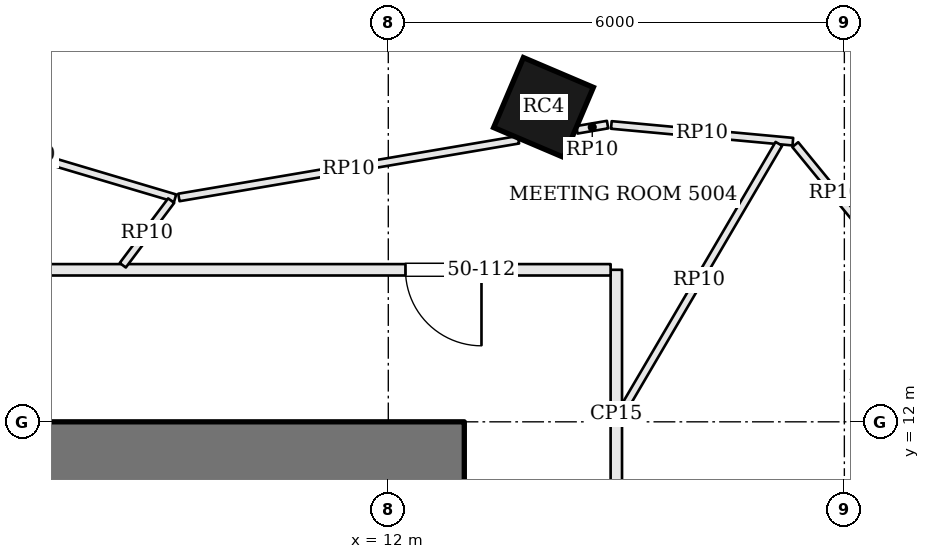
"""IFC4 building model, lengths in metres.
Left out: names, types, materials, properties, quantities, classifications, styles, units other than length and angle.
Written with IfcOpenShell. Run it as: python <this file> out.ifc"""

import sys

from ifc_helpers import new_model, si_unit, direction, frame, frame_2d, origin, origin_2d, place, context, subcontext, project, spatial, rectangle, extrude, element, fill, save


model = new_model("IFC4")
c1 = context("Model", 3, precision=1e-05, world=origin(), true_north=direction((0.0, 1.0)))
c2 = subcontext(c1, "Body", "Model", "MODEL_VIEW")
j1 = project(units=[si_unit("LENGTHUNIT", "METRE"), si_unit("PLANEANGLEUNIT", "RADIAN")], contexts=[c1])
p1 = place(None, origin())
s1 = spatial("IfcSite", under=j1, at=p1, CompositionType="ELEMENT")
p2 = place(p1, origin())
s2 = spatial("IfcBuilding", under=s1, at=p2, CompositionType="ELEMENT")
p3 = place(p2, frame((0.0, 0.0, 205.2)))
s3 = spatial("IfcBuildingStorey", under=s2, at=p3, CompositionType="ELEMENT", Elevation=205.2)
p4 = place(p3, frame((-13.0, 11.6, 0.0), z_axis=(0.0, 0.0, 1.0), x_axis=(1.0, 0.0, 0.0)))
e1 = element("IfcWall", 1, at=p4, inside=s3, PredefinedType="SHEAR", context=c2, shape_type="SweptSolid", body=[
    extrude(rectangle(XDim=26.0, YDim=0.8, at=frame_2d((13.0, 0.0))), origin(), (0.0, 0.0, 1.0), 3.9),
])
p5 = place(p4, frame((9.225, 0.0, 0.0)))
e2 = element("IfcOpeningElement", 2, at=p5, cuts=e1, PredefinedType="OPENING", context=c2, shape_type="SweptSolid", body=[
    extrude(rectangle(XDim=1.0, YDim=2.1, at=frame_2d((0.5, 1.05))), frame((0.0, 0.41, 0.0), z_axis=(0.0, -1.0, 0.0), x_axis=(1.0, 0.0, 0.0)), (0.0, 0.0, 1.0), 0.82),
])
p6 = place(p4, frame((11.825, 0.0, 0.0)))
e3 = element("IfcOpeningElement", 3, at=p6, cuts=e1, PredefinedType="OPENING", context=c2, shape_type="SweptSolid", body=[
    extrude(rectangle(XDim=0.7, YDim=2.1, at=frame_2d((0.35, 1.05))), frame((0.0, 0.41, 0.0), z_axis=(0.0, -1.0, 0.0), x_axis=(1.0, 0.0, 0.0)), (0.0, 0.0, 1.0), 0.82),
])
p7 = place(p4, frame((14.125, 0.0, 0.0)))
e4 = element("IfcOpeningElement", 4, at=p7, cuts=e1, PredefinedType="OPENING", context=c2, shape_type="SweptSolid", body=[
    extrude(rectangle(XDim=1.0, YDim=2.1, at=frame_2d((0.5, 1.05))), frame((0.0, 0.41, 0.0), z_axis=(0.0, -1.0, 0.0), x_axis=(1.0, 0.0, 0.0)), (0.0, 0.0, 1.0), 0.82),
])
p8 = place(p4, frame((16.625, 0.0, 0.0)))
e5 = element("IfcOpeningElement", 5, at=p8, cuts=e1, PredefinedType="OPENING", context=c2, shape_type="SweptSolid", body=[
    extrude(rectangle(XDim=0.9, YDim=2.1, at=frame_2d((0.45, 1.05))), frame((0.0, 0.41, 0.0), z_axis=(0.0, -1.0, 0.0), x_axis=(1.0, 0.0, 0.0)), (0.0, 0.0, 1.0), 0.82),
])
p9 = place(p3, frame((14.042, 16.136, 0.0), z_axis=(0.0, 0.0, 1.0), x_axis=(-0.920167856842, 0.391524092789, 0.0)))
e6 = element("IfcColumn", 6, at=p9, inside=s3, PredefinedType="COLUMN", context=c2, shape_type="SweptSolid", body=[
    extrude(rectangle(XDim=1.0, YDim=1.0, at=origin_2d()), origin(), (0.0, 0.0, 1.0), 3.9),
])
p10 = place(p3, frame((15.0, 10.196, 0.0), z_axis=(0.0, 0.0, 1.0), x_axis=(0.0, 1.0, 0.0)))
e7 = element("IfcWall", 7, at=p10, inside=s3, PredefinedType="PARTITIONING", context=c2, shape_type="SweptSolid", body=[
    extrude(rectangle(XDim=3.804, YDim=0.15, at=frame_2d((1.902, 0.0))), origin(), (0.0, 0.0, 1.0), 3.084),
])
p11 = place(p3, frame((14.925, 14.0, 0.0), z_axis=(0.0, 0.0, 1.0), x_axis=(-1.0, 0.0, 0.0)))
e8 = element("IfcWall", 8, at=p11, inside=s3, PredefinedType="PARTITIONING", context=c2, shape_type="SweptSolid", body=[
    extrude(rectangle(XDim=29.925, YDim=0.15, at=frame_2d((14.962, 0.0))), origin(), (0.0, 0.0, 1.0), 3.084),
])
p12 = place(p11, frame((1.699, 0.0, 0.0)))
e9 = element("IfcOpeningElement", 9, at=p12, cuts=e8, PredefinedType="OPENING", context=c2, shape_type="SweptSolid", body=[
    extrude(rectangle(XDim=1.0, YDim=2.4, at=frame_2d((0.5, 1.2))), frame((0.0, 0.085, 0.0), z_axis=(0.0, -1.0, 0.0), x_axis=(1.0, 0.0, 0.0)), (0.0, 0.0, 1.0), 0.17),
])
p13 = place(p11, frame((10.223, 0.0, 0.0)))
e10 = element("IfcOpeningElement", 10, at=p13, cuts=e8, PredefinedType="OPENING", context=c2, shape_type="SweptSolid", body=[
    extrude(rectangle(XDim=1.0, YDim=2.4, at=frame_2d((0.5, 1.2))), frame((0.0, 0.085, 0.0), z_axis=(0.0, -1.0, 0.0), x_axis=(1.0, 0.0, 0.0)), (0.0, 0.0, 1.0), 0.17),
])
p14 = place(p11, frame((18.49, 0.0, 0.0)))
e11 = element("IfcOpeningElement", 11, at=p14, cuts=e8, PredefinedType="OPENING", context=c2, shape_type="SweptSolid", body=[
    extrude(rectangle(XDim=1.0, YDim=2.4, at=frame_2d((0.5, 1.2))), frame((0.0, 0.085, 0.0), z_axis=(0.0, -1.0, 0.0), x_axis=(1.0, 0.0, 0.0)), (0.0, 0.0, 1.0), 0.17),
])
p15 = place(p3, frame((5.377, 16.079, 0.0), z_axis=(0.0, 0.0, 1.0), x_axis=(0.958503323659, -0.28508135424, 0.0)))
e12 = element("IfcWall", 12, at=p15, inside=s3, PredefinedType="PARTITIONING", context=c2, shape_type="SweptSolid", body=[
    extrude(rectangle(XDim=3.984, YDim=0.1, at=frame_2d((1.992, 0.0))), origin(), (0.0, 0.0, 1.0), 3.084),
])
p16 = place(p3, frame((9.245, 14.952, 0.0), z_axis=(0.0, 0.0, 1.0), x_axis=(0.985863233989, 0.167552033319, 0.0)))
e13 = element("IfcWall", 13, at=p16, inside=s3, PredefinedType="PARTITIONING", context=c2, shape_type="SweptSolid", body=[
    extrude(rectangle(XDim=4.531, YDim=0.1, at=frame_2d((2.266, 0.0))), origin(), (0.0, 0.0, 1.0), 3.084),
])
p17 = place(p3, frame((14.482, 15.842, 0.0), z_axis=(0.0, 0.0, 1.0), x_axis=(0.985806446381, 0.167885825111, 0.0)))
e14 = element("IfcWall", 14, at=p17, inside=s3, PredefinedType="PARTITIONING", context=c2, shape_type="SweptSolid", body=[
    extrude(rectangle(XDim=0.409, YDim=0.1, at=frame_2d((0.204, 0.0))), origin(), (0.0, 0.0, 1.0), 3.084),
])
p18 = place(p3, frame((14.935, 15.906, 0.0), z_axis=(0.0, 0.0, 1.0), x_axis=(0.995783150827, -0.09173830459, 0.0)))
e15 = element("IfcWall", 15, at=p18, inside=s3, PredefinedType="PARTITIONING", context=c2, shape_type="SweptSolid", body=[
    extrude(rectangle(XDim=2.398, YDim=0.1, at=frame_2d((1.199, 0.0))), origin(), (0.0, 0.0, 1.0), 3.084),
])
p19 = place(p3, frame((17.354, 15.647, 0.0), z_axis=(0.0, 0.0, 1.0), x_axis=(0.632948103301, -0.774194225326, 0.0)))
e16 = element("IfcWall", 16, at=p19, inside=s3, PredefinedType="PARTITIONING", context=c2, shape_type="SweptSolid", body=[
    extrude(rectangle(XDim=1.652, YDim=0.1, at=frame_2d((0.826, 0.0))), origin(), (0.0, 0.0, 1.0), 3.084),
])
p20 = place(p3, frame((15.038, 12.074, 0.0), z_axis=(0.0, 0.0, 1.0), x_axis=(0.5056938513, 0.862713004862, 0.0)))
e17 = element("IfcWall", 17, at=p20, inside=s3, PredefinedType="PARTITIONING", context=c2, shape_type="SweptSolid", body=[
    extrude(rectangle(XDim=4.153, YDim=0.1, at=frame_2d((2.076, 0.0))), origin(), (0.0, 0.0, 1.0), 3.084),
])
p21 = place(p3, frame((8.507, 14.06, 0.0), z_axis=(0.0, 0.0, 1.0), x_axis=(0.599742509515, 0.800193053132, 0.0)))
e18 = element("IfcWall", 18, at=p21, inside=s3, PredefinedType="PARTITIONING", context=c2, shape_type="SweptSolid", body=[
    extrude(rectangle(XDim=1.062, YDim=0.1, at=frame_2d((0.531, 0.0))), origin(), (0.0, 0.0, 1.0), 3.084),
])
p22 = place(p12, origin())
e19 = element("IfcDoor", 19, at=p22, inside=s3, OperationType="SINGLE_SWING_LEFT", PredefinedType="DOOR", context=c2, shape_type="SweptSolid", body=[
    extrude(rectangle(XDim=1.0, YDim=2.4, at=frame_2d((0.5, 1.2))), frame((0.0, 0.025, 0.0), z_axis=(0.0, -1.0, 0.0), x_axis=(1.0, 0.0, 0.0)), (0.0, 0.0, 1.0), 0.05),
])
fill(e9, e19)
save(model, sys.argv[1])
